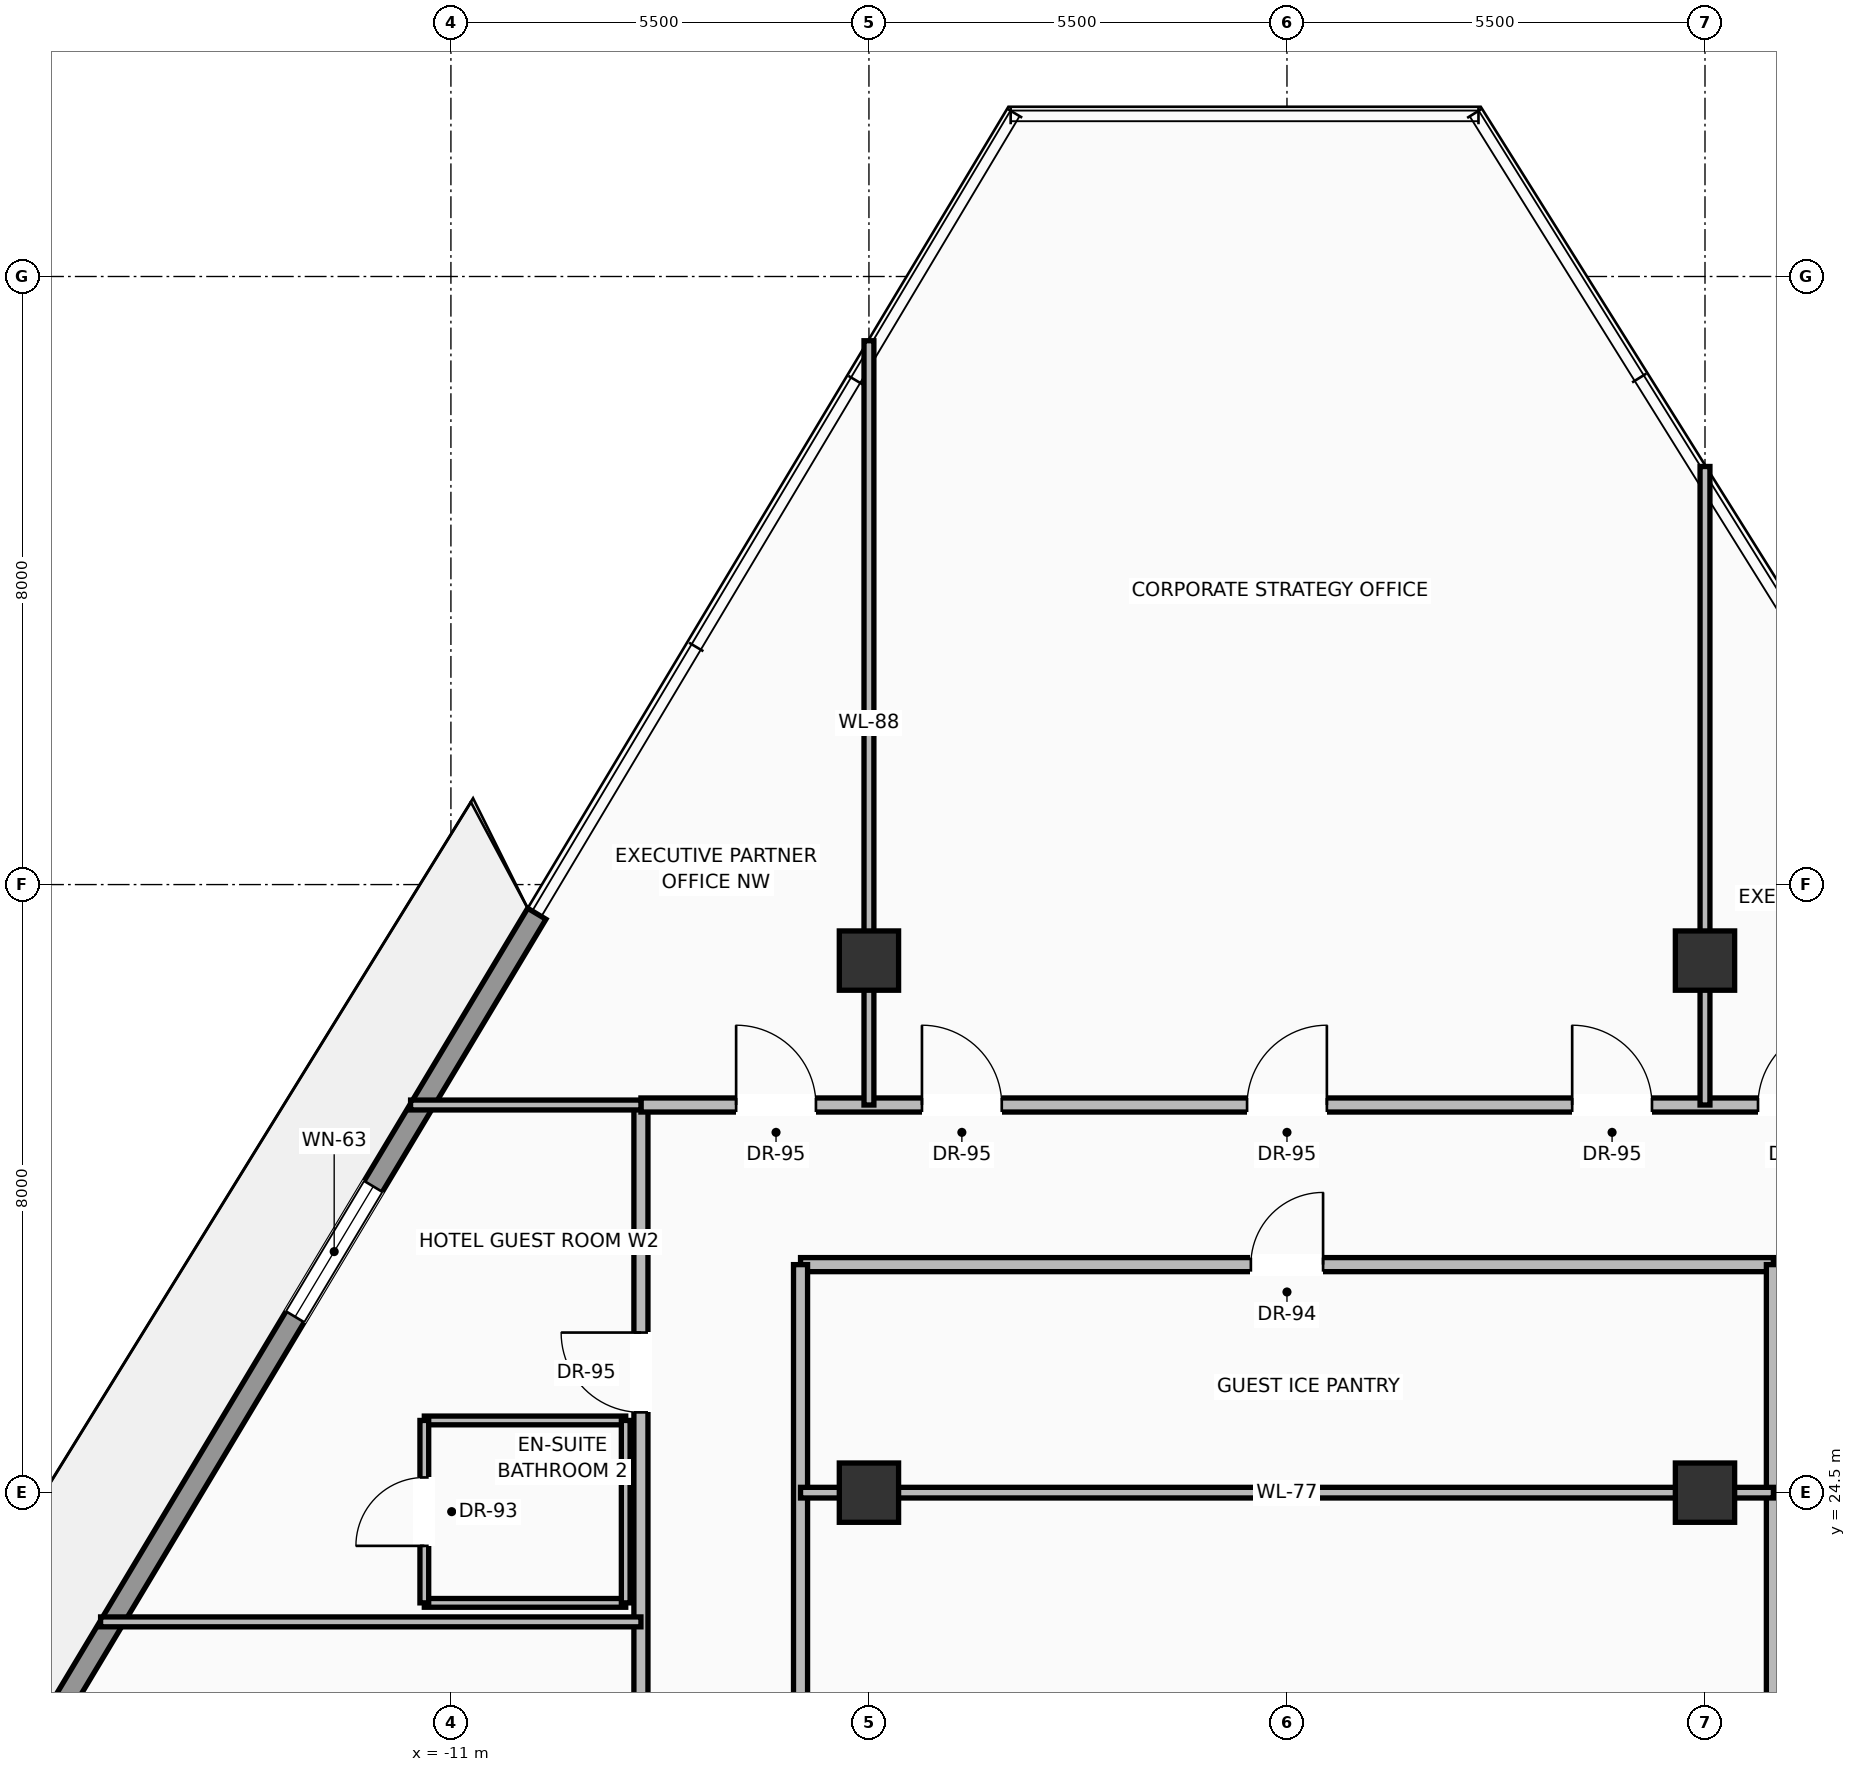
"""IFC4 building model, lengths in metres.
Left out: names, types, materials, properties, quantities, classifications, styles, units other than length and angle.
Written with IfcOpenShell. Run it as: python <this file> out.ifc"""

import sys

from ifc_helpers import new_model, si_unit, direction, frame, frame_2d, origin, origin_2d, place, context, subcontext, project, spatial, rectangle, extrude, source, transform, mapped, element, fill, save


model = new_model("IFC4")
c1 = context("Model", 3, precision=1e-05, world=origin(), true_north=direction((0.0, 1.0)))
c2 = subcontext(c1, "Body", "Model", "MODEL_VIEW")
j1 = project(units=[si_unit("LENGTHUNIT", "METRE"), si_unit("PLANEANGLEUNIT", "RADIAN")], contexts=[c1])
p1 = place(None, origin())
s1 = spatial("IfcSite", under=j1, at=p1, CompositionType="ELEMENT")
p2 = place(p1, origin())
s2 = spatial("IfcBuilding", under=s1, at=p2, CompositionType="ELEMENT")
p3 = place(p2, frame((0.0, 0.0, 220.0)))
s3 = spatial("IfcBuildingStorey", under=s2, at=p3, CompositionType="ELEMENT", Elevation=220.0)
m1 = source(origin(), c2, "Body", "SweptSolid", [
    extrude(rectangle(XDim=0.78, YDim=0.78, at=origin_2d()), origin(), (0.0, 0.0, 1.0), 3.45),
])
for number, where, z_axis, x_axis in (
    (1, (-5.5, 24.5, 0.0), (0.0, 0.0, 1.0), (1.0, 0.0, 0.0)),
    (2, (5.5, 24.5, 0.0), (0.0, 0.0, 1.0), (1.0, 0.0, 0.0)),
    (3, (-5.5, 31.5, 0.0), (0.0, 0.0, 1.0), (1.0, 0.0, 0.0)),
    (4, (5.5, 31.5, 0.0), (0.0, 0.0, 1.0), (1.0, 0.0, 0.0)),
):
    element("IfcColumn", number, at=place(p3, frame(where, z_axis=z_axis, x_axis=x_axis)), inside=s3, PredefinedType="COLUMN", context=c2, shape_type="MappedRepresentation", body=[
        mapped(m1, transform((0.0, 0.0, 0.0), scale=1.0)),
    ])
p4 = place(p3, frame((-19.808, 15.546, 0.0), z_axis=(0.0, 0.0, 1.0), x_axis=(0.514354531287, 0.857577644382, 0.0)))
e5 = element("IfcWall", 5, at=p4, inside=s3, PredefinedType="SOLIDWALL", context=c2, shape_type="SweptSolid", body=[
    extrude(rectangle(XDim=19.322, YDim=0.28, at=frame_2d((9.661, 0.0))), origin(), (0.0, 0.0, 1.0), 2.82),
])
p5 = place(p4, frame((4.637, 0.0, 0.0)))
e6 = element("IfcOpeningElement", 6, at=p5, cuts=e5, PredefinedType="OPENING", context=c2, shape_type="SweptSolid", body=[
    extrude(rectangle(XDim=1.6, YDim=2.35, at=frame_2d((0.8, 1.175))), frame((0.0, 0.15, 0.0), z_axis=(0.0, -1.0, 0.0), x_axis=(1.0, 0.0, 0.0)), (0.0, 0.0, 1.0), 0.3),
])
p6 = place(p4, frame((13.139, 0.0, 0.9)))
e7 = element("IfcOpeningElement", 7, at=p6, cuts=e5, PredefinedType="OPENING", context=c2, shape_type="SweptSolid", body=[
    extrude(rectangle(XDim=2.0, YDim=1.75, at=frame_2d((1.0, 0.875))), frame((0.0, 0.15, 0.0), z_axis=(0.0, -1.0, 0.0), x_axis=(1.0, 0.0, 0.0)), (0.0, 0.0, 1.0), 0.3),
])
p7 = place(p3, frame((-6.4, 27.5, 0.0), z_axis=(0.0, 0.0, 1.0), x_axis=(1.0, 0.0, 0.0)))
e8 = element("IfcWall", 8, at=p7, inside=s3, PredefinedType="PARTITIONING", context=c2, shape_type="SweptSolid", body=[
    extrude(rectangle(XDim=12.8, YDim=0.185, at=frame_2d((6.4, 0.0))), origin(), (0.0, 0.0, 1.0), 3.232),
])
p8 = place(p7, frame((5.925, 0.0, 0.0)))
e9 = element("IfcOpeningElement", 9, at=p8, cuts=e8, PredefinedType="OPENING", context=c2, shape_type="SweptSolid", body=[
    extrude(rectangle(XDim=0.95, YDim=2.2, at=frame_2d((0.475, 1.1))), frame((0.0, 0.103, 0.0), z_axis=(0.0, -1.0, 0.0), x_axis=(1.0, 0.0, 0.0)), (0.0, 0.0, 1.0), 0.205),
])
for number, where, z_axis, x_axis in (
    (10, (-6.4, 18.4, 0.0), (0.0, 0.0, 1.0), (0.0, 1.0, 0.0)),
    (11, (6.4, 18.4, 0.0), (0.0, 0.0, 1.0), (0.0, 1.0, 0.0)),
):
    element("IfcWall", number, at=place(p3, frame(where, z_axis=z_axis, x_axis=x_axis)), inside=s3, PredefinedType="PARTITIONING", context=c2, shape_type="SweptSolid", body=[
        extrude(rectangle(XDim=9.1, YDim=0.185, at=frame_2d((4.55, 0.0))), origin(), (0.0, 0.0, 1.0), 3.232),
    ])
p9 = place(p3, frame((-8.5, 16.3, 0.0), z_axis=(0.0, 0.0, 1.0), x_axis=(0.0, 1.0, 0.0)))
e12 = element("IfcWall", 12, at=p9, inside=s3, PredefinedType="PARTITIONING", context=c2, shape_type="SweptSolid", body=[
    extrude(rectangle(XDim=13.3, YDim=0.185, at=frame_2d((6.65, 0.0))), origin(), (0.0, 0.0, 1.0), 3.232),
])
p10 = place(p9, frame((3.136, 0.0, 0.0)))
e13 = element("IfcOpeningElement", 13, at=p10, cuts=e12, PredefinedType="OPENING", context=c2, shape_type="SweptSolid", body=[
    extrude(rectangle(XDim=1.05, YDim=2.25, at=frame_2d((0.525, 1.125))), frame((0.0, 0.103, 0.0), z_axis=(0.0, -1.0, 0.0), x_axis=(1.0, 0.0, 0.0)), (0.0, 0.0, 1.0), 0.205),
])
p11 = place(p9, frame((9.256, 0.0, 0.0)))
e14 = element("IfcOpeningElement", 14, at=p11, cuts=e12, PredefinedType="OPENING", context=c2, shape_type="SweptSolid", body=[
    extrude(rectangle(XDim=1.05, YDim=2.25, at=frame_2d((0.525, 1.125))), frame((0.0, 0.103, 0.0), z_axis=(0.0, -1.0, 0.0), x_axis=(1.0, 0.0, 0.0)), (0.0, 0.0, 1.0), 0.205),
])
p12 = place(p3, frame((-8.5, 29.6, 0.0), z_axis=(0.0, 0.0, 1.0), x_axis=(1.0, 0.0, 0.0)))
e15 = element("IfcWall", 15, at=p12, inside=s3, PredefinedType="PARTITIONING", context=c2, shape_type="SweptSolid", body=[
    extrude(rectangle(XDim=17.0, YDim=0.185, at=frame_2d((8.5, 0.0))), origin(), (0.0, 0.0, 1.0), 3.232),
])
p13 = place(p12, frame((3.698, 0.0, 0.0)))
e16 = element("IfcOpeningElement", 16, at=p13, cuts=e15, PredefinedType="OPENING", context=c2, shape_type="SweptSolid", body=[
    extrude(rectangle(XDim=1.05, YDim=2.25, at=frame_2d((0.525, 1.125))), frame((0.0, 0.103, 0.0), z_axis=(0.0, -1.0, 0.0), x_axis=(1.0, 0.0, 0.0)), (0.0, 0.0, 1.0), 0.205),
])
p14 = place(p12, frame((7.975, 0.0, 0.0)))
e17 = element("IfcOpeningElement", 17, at=p14, cuts=e15, PredefinedType="OPENING", context=c2, shape_type="SweptSolid", body=[
    extrude(rectangle(XDim=1.05, YDim=2.25, at=frame_2d((0.525, 1.125))), frame((0.0, 0.103, 0.0), z_axis=(0.0, -1.0, 0.0), x_axis=(1.0, 0.0, 0.0)), (0.0, 0.0, 1.0), 0.205),
])
p15 = place(p12, frame((12.252, 0.0, 0.0)))
e18 = element("IfcOpeningElement", 18, at=p15, cuts=e15, PredefinedType="OPENING", context=c2, shape_type="SweptSolid", body=[
    extrude(rectangle(XDim=1.05, YDim=2.25, at=frame_2d((0.525, 1.125))), frame((0.0, 0.103, 0.0), z_axis=(0.0, -1.0, 0.0), x_axis=(1.0, 0.0, 0.0)), (0.0, 0.0, 1.0), 0.205),
])
p16 = place(p12, frame((14.698, 0.0, 0.0)))
e19 = element("IfcOpeningElement", 19, at=p16, cuts=e15, PredefinedType="OPENING", context=c2, shape_type="SweptSolid", body=[
    extrude(rectangle(XDim=1.05, YDim=2.25, at=frame_2d((0.525, 1.125))), frame((0.0, 0.103, 0.0), z_axis=(0.0, -1.0, 0.0), x_axis=(1.0, 0.0, 0.0)), (0.0, 0.0, 1.0), 0.205),
])
p17 = place(p12, frame((1.252, 0.0, 0.0)))
e20 = element("IfcOpeningElement", 20, at=p17, cuts=e15, PredefinedType="OPENING", context=c2, shape_type="SweptSolid", body=[
    extrude(rectangle(XDim=1.05, YDim=2.25, at=frame_2d((0.525, 1.125))), frame((0.0, 0.103, 0.0), z_axis=(0.0, -1.0, 0.0), x_axis=(1.0, 0.0, 0.0)), (0.0, 0.0, 1.0), 0.205),
])
p18 = place(p3, frame((-6.4, 24.5, 0.0), z_axis=(0.0, 0.0, 1.0), x_axis=(1.0, 0.0, 0.0)))
e21 = element("IfcWall", 21, at=p18, inside=s3, PredefinedType="PARTITIONING", context=c2, shape_type="SweptSolid", body=[
    extrude(rectangle(XDim=12.8, YDim=0.14, at=frame_2d((6.4, 0.0))), origin(), (0.0, 0.0, 1.0), 2.683),
])
p19 = place(p3, frame((-11.531, 29.6, 0.0), z_axis=(0.0, 0.0, 1.0), x_axis=(1.0, 0.0, 0.0)))
e22 = element("IfcWall", 22, at=p19, inside=s3, PredefinedType="PARTITIONING", context=c2, shape_type="SweptSolid", body=[
    extrude(rectangle(XDim=3.031, YDim=0.13, at=frame_2d((1.515, 0.0))), origin(), (0.0, 0.0, 1.0), 3.232),
])
p20 = place(p3, frame((-5.5, 29.6, 0.0), z_axis=(0.0, 0.0, 1.0), x_axis=(0.0, 1.0, 0.0)))
e23 = element("IfcWall", 23, at=p20, inside=s3, PredefinedType="PARTITIONING", context=c2, shape_type="SweptSolid", body=[
    extrude(rectangle(XDim=10.055, YDim=0.13, at=frame_2d((5.027, 0.0))), origin(), (0.0, 0.0, 1.0), 2.683),
])
p21 = place(p3, frame((5.5, 29.6, 0.0), z_axis=(0.0, 0.0, 1.0), x_axis=(0.0, 1.0, 0.0)))
e24 = element("IfcWall", 24, at=p21, inside=s3, PredefinedType="PARTITIONING", context=c2, shape_type="SweptSolid", body=[
    extrude(rectangle(XDim=8.4, YDim=0.13, at=frame_2d((4.2, 0.0))), origin(), (0.0, 0.0, 1.0), 2.683),
])
p22 = place(p3, frame((-15.609, 22.8, 0.0), z_axis=(0.0, 0.0, 1.0), x_axis=(1.0, 0.0, 0.0)))
e25 = element("IfcWall", 25, at=p22, inside=s3, PredefinedType="PARTITIONING", context=c2, shape_type="SweptSolid", body=[
    extrude(rectangle(XDim=7.109, YDim=0.13, at=frame_2d((3.555, 0.0))), origin(), (0.0, 0.0, 1.0), 3.232),
])
for number, where, z_axis, x_axis in (
    (26, (-11.35, 23.05, 0.0), (0.0, 0.0, 1.0), (1.0, 0.0, 0.0)),
    (27, (-11.35, 25.45, 0.0), (0.0, 0.0, 1.0), (1.0, 0.0, 0.0)),
):
    element("IfcWall", number, at=place(p3, frame(where, z_axis=z_axis, x_axis=x_axis)), inside=s3, PredefinedType="PARTITIONING", context=c2, shape_type="SweptSolid", body=[
        extrude(rectangle(XDim=2.65, YDim=0.115, at=frame_2d((1.325, 0.0))), origin(), (0.0, 0.0, 1.0), 3.232),
    ])
p23 = place(p3, frame((-11.35, 23.05, 0.0), z_axis=(0.0, 0.0, 1.0), x_axis=(0.0, 1.0, 0.0)))
e28 = element("IfcWall", 28, at=p23, inside=s3, PredefinedType="PARTITIONING", context=c2, shape_type="SweptSolid", body=[
    extrude(rectangle(XDim=2.4, YDim=0.115, at=frame_2d((1.2, 0.0))), origin(), (0.0, 0.0, 1.0), 3.232),
])
p24 = place(p23, frame((0.75, 0.0, 0.0)))
e29 = element("IfcOpeningElement", 29, at=p24, cuts=e28, PredefinedType="OPENING", context=c2, shape_type="SweptSolid", body=[
    extrude(rectangle(XDim=0.9, YDim=2.15, at=frame_2d((0.45, 1.075))), frame((0.0, 0.067, 0.0), z_axis=(0.0, -1.0, 0.0), x_axis=(1.0, 0.0, 0.0)), (0.0, 0.0, 1.0), 0.135),
])
p25 = place(p3, frame((-8.7, 23.05, 0.0), z_axis=(0.0, 0.0, 1.0), x_axis=(0.0, 1.0, 0.0)))
e30 = element("IfcWall", 30, at=p25, inside=s3, PredefinedType="PARTITIONING", context=c2, shape_type="SweptSolid", body=[
    extrude(rectangle(XDim=2.4, YDim=0.115, at=frame_2d((1.2, 0.0))), origin(), (0.0, 0.0, 1.0), 3.232),
])
m2 = source(origin(), c2, "Body", "SweptSolid", [
    extrude(rectangle(XDim=2.0, YDim=1.75, at=frame_2d((1.0, 0.875))), frame((0.0, 0.03, 0.0), z_axis=(0.0, -1.0, 0.0), x_axis=(1.0, 0.0, 0.0)), (0.0, 0.0, 1.0), 0.06),
])
p26 = place(p6, origin())
e31 = element("IfcWindow", 31, at=p26, inside=s3, PartitioningType="SINGLE_PANEL", PredefinedType="WINDOW", context=c2, shape_type="MappedRepresentation", body=[
    mapped(m2, transform((0.0, 0.0, 0.0), scale=1.0)),
])
fill(e7, e31)
m3 = source(origin(), c2, "Body", "SweptSolid", [
    extrude(rectangle(XDim=0.95, YDim=2.2, at=frame_2d((0.475, 1.1))), frame((0.0, 0.025, 0.0), z_axis=(0.0, -1.0, 0.0), x_axis=(1.0, 0.0, 0.0)), (0.0, 0.0, 1.0), 0.05),
])
p27 = place(p8, origin())
e32 = element("IfcDoor", 32, at=p27, inside=s3, OperationType="SINGLE_SWING_RIGHT", PredefinedType="DOOR", context=c2, shape_type="MappedRepresentation", body=[
    mapped(m3, transform((0.0, 0.0, 0.0), scale=1.0)),
])
fill(e9, e32)
m4 = source(origin(), c2, "Body", "SweptSolid", [
    extrude(rectangle(XDim=1.05, YDim=2.25, at=frame_2d((0.525, 1.125))), frame((0.0, 0.025, 0.0), z_axis=(0.0, -1.0, 0.0), x_axis=(1.0, 0.0, 0.0)), (0.0, 0.0, 1.0), 0.05),
])
p28 = place(p11, origin())
e33 = element("IfcDoor", 33, at=p28, inside=s3, OperationType="SINGLE_SWING_RIGHT", PredefinedType="DOOR", context=c2, shape_type="MappedRepresentation", body=[
    mapped(m4, transform((0.0, 0.0, 0.0), scale=1.0)),
])
fill(e14, e33)
m5 = source(origin(), c2, "Body", "SweptSolid", [
    extrude(rectangle(XDim=0.9, YDim=2.15, at=frame_2d((0.45, 1.075))), frame((0.0, 0.025, 0.0), z_axis=(0.0, -1.0, 0.0), x_axis=(1.0, 0.0, 0.0)), (0.0, 0.0, 1.0), 0.05),
])
p29 = place(p24, origin())
e34 = element("IfcDoor", 34, at=p29, inside=s3, OperationType="SINGLE_SWING_LEFT", PredefinedType="DOOR", context=c2, shape_type="MappedRepresentation", body=[
    mapped(m5, transform((0.0, 0.0, 0.0), scale=1.0)),
])
fill(e29, e34)
p30 = place(p13, origin())
e35 = element("IfcDoor", 35, at=p30, inside=s3, OperationType="SINGLE_SWING_LEFT", PredefinedType="DOOR", context=c2, shape_type="MappedRepresentation", body=[
    mapped(m4, transform((0.0, 0.0, 0.0), scale=1.0)),
])
fill(e16, e35)
p31 = place(p14, origin())
e36 = element("IfcDoor", 36, at=p31, inside=s3, OperationType="SINGLE_SWING_RIGHT", PredefinedType="DOOR", context=c2, shape_type="MappedRepresentation", body=[
    mapped(m4, transform((0.0, 0.0, 0.0), scale=1.0)),
])
fill(e17, e36)
p32 = place(p15, origin())
e37 = element("IfcDoor", 37, at=p32, inside=s3, OperationType="SINGLE_SWING_LEFT", PredefinedType="DOOR", context=c2, shape_type="MappedRepresentation", body=[
    mapped(m4, transform((0.0, 0.0, 0.0), scale=1.0)),
])
fill(e18, e37)
p33 = place(p16, origin())
e38 = element("IfcDoor", 38, at=p33, inside=s3, OperationType="SINGLE_SWING_RIGHT", PredefinedType="DOOR", context=c2, shape_type="MappedRepresentation", body=[
    mapped(m4, transform((0.0, 0.0, 0.0), scale=1.0)),
])
fill(e19, e38)
p34 = place(p17, origin())
e39 = element("IfcDoor", 39, at=p34, inside=s3, OperationType="SINGLE_SWING_LEFT", PredefinedType="DOOR", context=c2, shape_type="MappedRepresentation", body=[
    mapped(m4, transform((0.0, 0.0, 0.0), scale=1.0)),
])
fill(e20, e39)
save(model, sys.argv[1])
